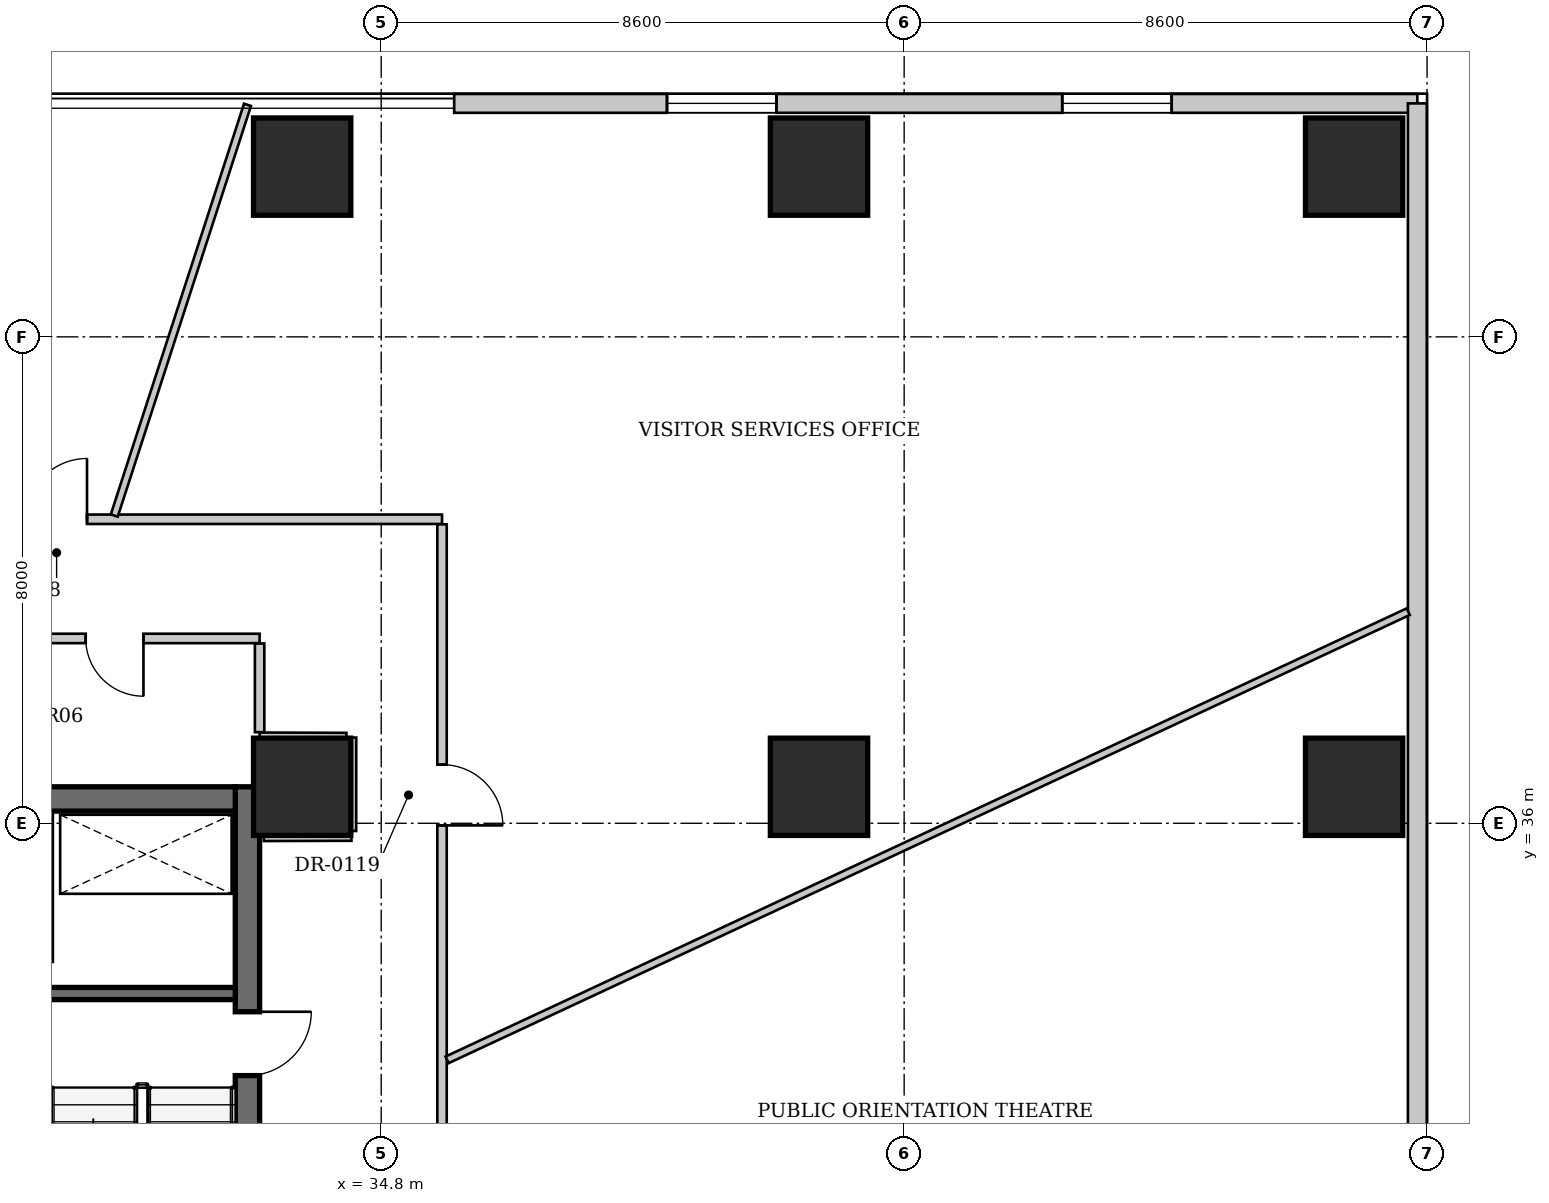
"""IFC4 building model, lengths in metres.
Left out: names, types, materials, properties, quantities, classifications, styles, units other than length and angle.
Written with IfcOpenShell. Run it as: python <this file> out.ifc"""

import sys

from ifc_helpers import new_model, si_unit, direction, frame, frame_2d, origin, origin_2d, place, context, subcontext, project, spatial, rectangle, extrude, source, transform, mapped, element, fill, save


model = new_model("IFC4")
c1 = context("Model", 3, precision=1e-05, world=origin(), true_north=direction((0.0, 1.0)))
c2 = subcontext(c1, "Body", "Model", "MODEL_VIEW")
j1 = project(units=[si_unit("LENGTHUNIT", "METRE"), si_unit("PLANEANGLEUNIT", "RADIAN")], contexts=[c1])
p1 = place(None, origin())
s1 = spatial("IfcSite", under=j1, at=p1, CompositionType="ELEMENT")
p2 = place(p1, origin())
s2 = spatial("IfcBuilding", under=s1, at=p2, CompositionType="ELEMENT")
p3 = place(p2, frame((0.0, 0.0, 5.2)))
s3 = spatial("IfcBuildingStorey", under=s2, at=p3, CompositionType="ELEMENT", Elevation=5.2)
for number, where, z_axis, x_axis in (
    (1, (50.8, 36.6, 0.0), (0.0, 0.0, 1.0), (1.0, 0.0, 0.0)),
    (2, (50.8, 46.8, 0.0), (0.0, 0.0, 1.0), (1.0, 0.0, 0.0)),
    (3, (33.5, 46.8, 0.0), (0.0, 0.0, 1.0), (1.0, 0.0, 0.0)),
    (4, (42.0, 46.8, 0.0), (0.0, 0.0, 1.0), (1.0, 0.0, 0.0)),
    (5, (33.5, 36.6, 0.0), (0.0, 0.0, 1.0), (1.0, 0.0, 0.0)),
    (6, (42.0, 36.6, 0.0), (0.0, 0.0, 1.0), (1.0, 0.0, 0.0)),
):
    element("IfcColumn", number, at=place(p3, frame(where, z_axis=z_axis, x_axis=x_axis)), inside=s3, PredefinedType="COLUMN", context=c2, shape_type="SweptSolid", body=[
        extrude(rectangle(XDim=1.6, YDim=1.6, at=origin_2d()), origin(), (0.0, 0.0, 1.0), 4.3),
    ])
p4 = place(p3, frame((36.0, 47.84, 0.0), z_axis=(0.0, 0.0, 1.0), x_axis=(1.0, 0.0, 0.0)))
e7 = element("IfcWall", 7, at=p4, inside=s3, PredefinedType="SOLIDWALL", context=c2, shape_type="SweptSolid", body=[
    extrude(rectangle(XDim=15.84, YDim=0.31, at=frame_2d((7.92, 0.0))), origin(), (0.0, 0.0, 1.0), 4.05),
])
p5 = place(p4, frame((3.5, 0.0, 0.95)))
e8 = element("IfcOpeningElement", 8, at=p5, cuts=e7, PredefinedType="OPENING", context=c2, shape_type="SweptSolid", body=[
    extrude(rectangle(XDim=1.8, YDim=2.4, at=frame_2d((0.9, 1.2))), frame((0.0, 0.165, 0.0), z_axis=(0.0, -1.0, 0.0), x_axis=(1.0, 0.0, 0.0)), (0.0, 0.0, 1.0), 0.33),
])
p6 = place(p4, frame((10.0, 0.0, 0.95)))
e9 = element("IfcOpeningElement", 9, at=p6, cuts=e7, PredefinedType="OPENING", context=c2, shape_type="SweptSolid", body=[
    extrude(rectangle(XDim=1.8, YDim=2.4, at=frame_2d((0.9, 1.2))), frame((0.0, 0.165, 0.0), z_axis=(0.0, -1.0, 0.0), x_axis=(1.0, 0.0, 0.0)), (0.0, 0.0, 1.0), 0.33),
])
p7 = place(p3, frame((51.84, 47.84, 0.0), z_axis=(0.0, 0.0, 1.0), x_axis=(0.0, -1.0, 0.0)))
e10 = element("IfcWall", 10, at=p7, inside=s3, PredefinedType="SOLIDWALL", context=c2, shape_type="SweptSolid", body=[
    extrude(rectangle(XDim=39.68, YDim=0.31, at=frame_2d((19.84, 0.0))), origin(), (0.0, 0.0, 1.0), 4.05),
])
p8 = place(p3, frame((32.6, 36.6, 0.0), z_axis=(0.0, 0.0, 1.0), x_axis=(0.0, -1.0, 0.0)))
e11 = element("IfcWall", 11, at=p8, inside=s3, PredefinedType="SHEAR", context=c2, shape_type="SweptSolid", body=[
    extrude(rectangle(XDim=10.8, YDim=0.4, at=frame_2d((5.4, 0.0))), origin(), (0.0, 0.0, 1.0), 4.6),
])
p9 = place(p8, frame((3.7, 0.0, 0.0)))
e12 = element("IfcOpeningElement", 12, at=p9, cuts=e11, PredefinedType="OPENING", context=c2, shape_type="SweptSolid", body=[
    extrude(rectangle(XDim=1.05, YDim=2.15, at=frame_2d((0.525, 1.075))), frame((0.0, 0.21, 0.0), z_axis=(0.0, -1.0, 0.0), x_axis=(1.0, 0.0, 0.0)), (0.0, 0.0, 1.0), 0.42),
])
p10 = place(p3, frame((19.6, 36.4, 0.0), z_axis=(0.0, 0.0, 1.0), x_axis=(1.0, 0.0, 0.0)))
e13 = element("IfcWall", 13, at=p10, inside=s3, PredefinedType="SHEAR", context=c2, shape_type="SweptSolid", body=[
    extrude(rectangle(XDim=12.8, YDim=0.4, at=frame_2d((6.4, 0.0))), origin(), (0.0, 0.0, 1.0), 4.6),
])
p11 = place(p3, frame((29.34, 33.2, 0.0), z_axis=(0.0, 0.0, 1.0), x_axis=(1.0, 0.0, 0.0)))
e14 = element("IfcWall", 14, at=p11, inside=s3, PredefinedType="SHEAR", context=c2, shape_type="SweptSolid", body=[
    extrude(rectangle(XDim=3.06, YDim=0.2, at=frame_2d((1.53, 0.0))), origin(), (0.0, 0.0, 1.0), 4.6),
])
p12 = place(p3, frame((32.8, 39.04, 0.0), z_axis=(0.0, 0.0, 1.0), x_axis=(-1.0, 0.0, 0.0)))
e15 = element("IfcWall", 15, at=p12, inside=s3, PredefinedType="PARTITIONING", context=c2, shape_type="SweptSolid", body=[
    extrude(rectangle(XDim=4.77, YDim=0.155, at=frame_2d((2.385, 0.0))), origin(), (0.0, 0.0, 1.0), 4.3),
])
p13 = place(p12, frame((1.91, 0.0, 0.0)))
e16 = element("IfcOpeningElement", 16, at=p13, cuts=e15, PredefinedType="OPENING", context=c2, shape_type="SweptSolid", body=[
    extrude(rectangle(XDim=0.95, YDim=2.15, at=frame_2d((0.475, 1.075))), frame((0.0, 0.087, 0.0), z_axis=(0.0, -1.0, 0.0), x_axis=(1.0, 0.0, 0.0)), (0.0, 0.0, 1.0), 0.175),
])
p14 = place(p3, frame((21.6, 41.0, 0.0), z_axis=(0.0, 0.0, 1.0), x_axis=(1.0, 0.0, 0.0)))
e17 = element("IfcWall", 17, at=p14, inside=s3, PredefinedType="PARTITIONING", context=c2, shape_type="SweptSolid", body=[
    extrude(rectangle(XDim=14.2, YDim=0.155, at=frame_2d((7.1, 0.0))), origin(), (0.0, 0.0, 1.0), 4.3),
])
p15 = place(p14, frame((7.362, 0.0, 0.0)))
e18 = element("IfcOpeningElement", 18, at=p15, cuts=e17, PredefinedType="OPENING", context=c2, shape_type="SweptSolid", body=[
    extrude(rectangle(XDim=1.0, YDim=2.15, at=frame_2d((0.5, 1.075))), frame((0.0, 0.087, 0.0), z_axis=(0.0, -1.0, 0.0), x_axis=(1.0, 0.0, 0.0)), (0.0, 0.0, 1.0), 0.175),
])
p16 = place(p3, frame((35.8, 40.917, 0.0), z_axis=(0.0, 0.0, 1.0), x_axis=(0.0, -1.0, 0.0)))
e19 = element("IfcWall", 19, at=p16, inside=s3, PredefinedType="PARTITIONING", context=c2, shape_type="SweptSolid", body=[
    extrude(rectangle(XDim=14.796, YDim=0.155, at=frame_2d((7.398, 0.0))), origin(), (0.0, 0.0, 1.0), 4.3),
])
p17 = place(p16, frame((3.951, 0.0, 0.0)))
e20 = element("IfcOpeningElement", 20, at=p17, cuts=e19, PredefinedType="OPENING", context=c2, shape_type="SweptSolid", body=[
    extrude(rectangle(XDim=1.0, YDim=2.15, at=frame_2d((0.5, 1.075))), frame((0.0, 0.087, 0.0), z_axis=(0.0, -1.0, 0.0), x_axis=(1.0, 0.0, 0.0)), (0.0, 0.0, 1.0), 0.175),
])
p18 = place(p3, frame((32.87, 35.785, 0.0), z_axis=(0.0, 0.0, 1.0), x_axis=(0.99999584892, 0.002881343971, 0.0)))
e21 = element("IfcWall", 21, at=p18, inside=s3, PredefinedType="PARTITIONING", context=c2, shape_type="SweptSolid", body=[
    extrude(rectangle(XDim=1.44, YDim=0.155, at=frame_2d((0.72, 0.0))), origin(), (0.0, 0.0, 1.0), 4.3),
])
p19 = place(p3, frame((34.311, 35.873, 0.0), z_axis=(0.0, 0.0, 1.0), x_axis=(0.000476644369, 0.999999886405, 0.0)))
e22 = element("IfcWall", 22, at=p19, inside=s3, PredefinedType="PARTITIONING", context=c2, shape_type="SweptSolid", body=[
    extrude(rectangle(XDim=1.537, YDim=0.155, at=frame_2d((0.768, 0.0))), origin(), (0.0, 0.0, 1.0), 4.3),
])
p20 = place(p3, frame((34.228, 37.41, 0.0), z_axis=(0.0, 0.0, 1.0), x_axis=(-0.999993554729, 0.003590334185, 0.0)))
e23 = element("IfcWall", 23, at=p20, inside=s3, PredefinedType="PARTITIONING", context=c2, shape_type="SweptSolid", body=[
    extrude(rectangle(XDim=1.428, YDim=0.155, at=frame_2d((0.714, 0.0))), origin(), (0.0, 0.0, 1.0), 4.3),
])
p21 = place(p3, frame((32.8, 37.499, 0.0), z_axis=(0.0, 0.0, 1.0), x_axis=(0.0, 1.0, 0.0)))
e24 = element("IfcWall", 24, at=p21, inside=s3, PredefinedType="PARTITIONING", context=c2, shape_type="SweptSolid", body=[
    extrude(rectangle(XDim=1.458, YDim=0.155, at=frame_2d((0.729, 0.0))), origin(), (0.0, 0.0, 1.0), 4.3),
])
p22 = place(p3, frame((35.884, 32.109, 0.0), z_axis=(0.0, 0.0, 1.0), x_axis=(0.90629790364, 0.422639456106, 0.0)))
e25 = element("IfcWall", 25, at=p22, inside=s3, PredefinedType="PARTITIONING", context=c2, shape_type="SweptSolid", body=[
    extrude(rectangle(XDim=17.441, YDim=0.12, at=frame_2d((8.72, 0.0))), origin(), (0.0, 0.0, 1.0), 4.3),
])
p23 = place(p3, frame((30.41, 41.062, 0.0), z_axis=(0.0, 0.0, 1.0), x_axis=(0.308512265312, 0.951220364664, 0.0)))
e26 = element("IfcWall", 26, at=p23, inside=s3, PredefinedType="PARTITIONING", context=c2, shape_type="SweptSolid", body=[
    extrude(rectangle(XDim=7.101, YDim=0.12, at=frame_2d((3.55, 0.0))), origin(), (0.0, 0.0, 1.0), 4.3),
])
m1 = source(origin(), c2, "Body", "SweptSolid", [
    extrude(rectangle(XDim=1.8, YDim=2.4, at=frame_2d((0.9, 1.2))), frame((0.0, 0.03, 0.0), z_axis=(0.0, -1.0, 0.0), x_axis=(1.0, 0.0, 0.0)), (0.0, 0.0, 1.0), 0.06),
])
p24 = place(p5, origin())
e27 = element("IfcWindow", 27, at=p24, inside=s3, PartitioningType="SINGLE_PANEL", PredefinedType="WINDOW", context=c2, shape_type="MappedRepresentation", body=[
    mapped(m1, transform((0.0, 0.0, 0.0), x_axis=(1.0, 0.0, 0.0), y_axis=(0.0, 1.0, 0.0), z_axis=(0.0, 0.0, 1.0), scale=1.0)),
])
fill(e8, e27)
p25 = place(p6, origin())
e28 = element("IfcWindow", 28, at=p25, inside=s3, PartitioningType="SINGLE_PANEL", PredefinedType="WINDOW", context=c2, shape_type="MappedRepresentation", body=[
    mapped(m1, transform((0.0, 0.0, 0.0), x_axis=(1.0, 0.0, 0.0), y_axis=(0.0, 1.0, 0.0), z_axis=(0.0, 0.0, 1.0), scale=1.0)),
])
fill(e9, e28)
m2 = source(origin(), c2, "Body", "SweptSolid", [
    extrude(rectangle(XDim=1.05, YDim=2.15, at=frame_2d((0.525, 1.075))), frame((0.0, 0.025, 0.0), z_axis=(0.0, -1.0, 0.0), x_axis=(1.0, 0.0, 0.0)), (0.0, 0.0, 1.0), 0.05),
])
p26 = place(p9, origin())
e29 = element("IfcDoor", 29, at=p26, inside=s3, OperationType="SINGLE_SWING_LEFT", PredefinedType="DOOR", context=c2, shape_type="MappedRepresentation", body=[
    mapped(m2, transform((0.0, 0.0, 0.0), x_axis=(1.0, 0.0, 0.0), y_axis=(0.0, 1.0, 0.0), z_axis=(0.0, 0.0, 1.0), scale=1.0)),
])
fill(e12, e29)
m3 = source(origin(), c2, "Body", "SweptSolid", [
    extrude(rectangle(XDim=0.95, YDim=2.15, at=frame_2d((0.475, 1.075))), frame((0.0, 0.025, 0.0), z_axis=(0.0, -1.0, 0.0), x_axis=(1.0, 0.0, 0.0)), (0.0, 0.0, 1.0), 0.05),
])
p27 = place(p13, origin())
e30 = element("IfcDoor", 30, at=p27, inside=s3, OperationType="SINGLE_SWING_LEFT", PredefinedType="DOOR", context=c2, shape_type="MappedRepresentation", body=[
    mapped(m3, transform((0.0, 0.0, 0.0), x_axis=(1.0, 0.0, 0.0), y_axis=(0.0, 1.0, 0.0), z_axis=(0.0, 0.0, 1.0), scale=1.0)),
])
fill(e16, e30)
m4 = source(origin(), c2, "Body", "SweptSolid", [
    extrude(rectangle(XDim=1.0, YDim=2.15, at=frame_2d((0.5, 1.075))), frame((0.0, 0.025, 0.0), z_axis=(0.0, -1.0, 0.0), x_axis=(1.0, 0.0, 0.0)), (0.0, 0.0, 1.0), 0.05),
])
p28 = place(p15, origin())
e31 = element("IfcDoor", 31, at=p28, inside=s3, OperationType="SINGLE_SWING_RIGHT", PredefinedType="DOOR", context=c2, shape_type="MappedRepresentation", body=[
    mapped(m4, transform((0.0, 0.0, 0.0), x_axis=(1.0, 0.0, 0.0), y_axis=(0.0, 1.0, 0.0), z_axis=(0.0, 0.0, 1.0), scale=1.0)),
])
fill(e18, e31)
p29 = place(p17, origin())
e32 = element("IfcDoor", 32, at=p29, inside=s3, OperationType="SINGLE_SWING_RIGHT", PredefinedType="DOOR", context=c2, shape_type="MappedRepresentation", body=[
    mapped(m4, transform((0.0, 0.0, 0.0), x_axis=(1.0, 0.0, 0.0), y_axis=(0.0, 1.0, 0.0), z_axis=(0.0, 0.0, 1.0), scale=1.0)),
])
fill(e20, e32)
save(model, sys.argv[1])
